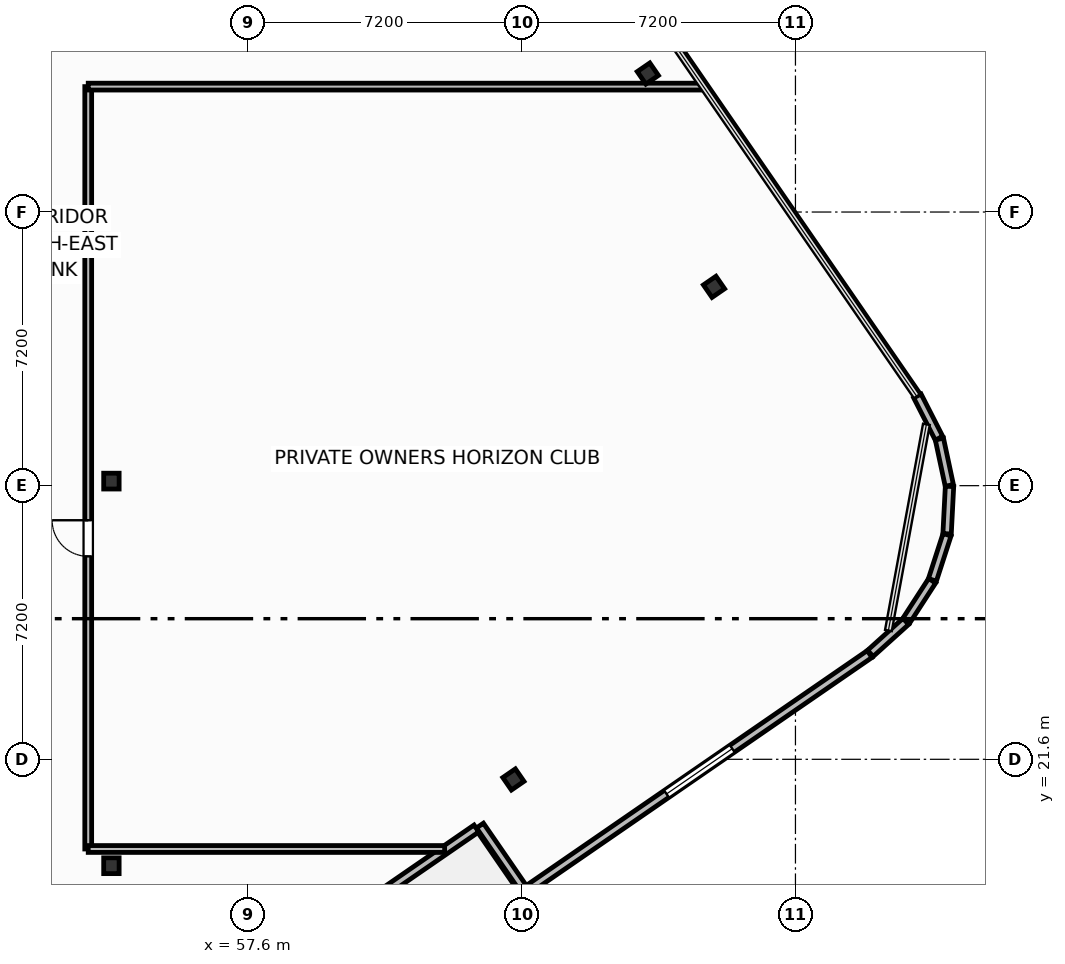
"""IFC4 building model, lengths in metres.
Left out: names, types, materials, properties, quantities, classifications, styles, units other than length and angle.
Written with IfcOpenShell. Run it as: python <this file> out.ifc"""

import sys

from ifc_helpers import new_model, si_unit, direction, frame, frame_2d, origin, origin_2d, place, context, subcontext, project, spatial, rectangle, i_section, extrude, element, fill, save


model = new_model("IFC4")
c1 = context("Model", 3, precision=1e-05, world=origin(), true_north=direction((0.0, 1.0)))
c2 = subcontext(c1, "Body", "Model", "MODEL_VIEW")
j1 = project(units=[si_unit("LENGTHUNIT", "METRE"), si_unit("PLANEANGLEUNIT", "RADIAN")], contexts=[c1])
p1 = place(None, origin())
s1 = spatial("IfcSite", under=j1, at=p1, CompositionType="ELEMENT")
p2 = place(p1, origin())
s2 = spatial("IfcBuilding", under=s1, at=p2, CompositionType="ELEMENT")
p3 = place(p2, frame((0.0, 0.0, 258.2)))
s3 = spatial("IfcBuildingStorey", under=s2, at=p3, CompositionType="ELEMENT", Elevation=258.2)
for number, where, z_axis, x_axis in (
    (1, (54.0, 18.8, 0.0), (0.0, 0.0, 1.0), (1.0, 0.0, 0.0)),
    (2, (54.0, 28.92, 0.0), (0.0, 0.0, 1.0), (1.0, 0.0, 0.0)),
):
    element("IfcColumn", number, at=place(p3, frame(where, z_axis=z_axis, x_axis=x_axis)), inside=s3, PredefinedType="COLUMN", context=c2, shape_type="SweptSolid", body=[
        extrude(i_section(OverallWidth=0.406, OverallDepth=0.416, WebThickness=0.03, FlangeThickness=0.048, FilletRadius=0.025, at=origin_2d()), origin(), (0.0, 0.0, 1.0), 3.7),
    ])
for number, where, z_axis, x_axis in (
    (3, (64.578, 21.07, 0.0), (0.0, 0.0, 1.0), (0.824, 0.567, 0.0)),
    (4, (69.857, 34.031, 0.0), (0.0, 0.0, 1.0), (0.824, 0.567, 0.0)),
    (5, (68.115, 39.644, 0.0), (0.0, 0.0, 1.0), (0.824, 0.567, 0.0)),
):
    element("IfcColumn", number, at=place(p3, frame(where, z_axis=z_axis, x_axis=x_axis)), inside=s3, PredefinedType="COLUMN", context=c2, shape_type="SweptSolid", body=[
        extrude(i_section(OverallWidth=0.401, OverallDepth=0.399, WebThickness=0.025, FlangeThickness=0.04, FilletRadius=0.022, at=origin_2d()), origin(), (0.0, 0.0, 1.0), 3.7),
    ])
p4 = place(p3, frame((63.605, 19.78, 0.0), z_axis=(0.0, 0.0, 1.0), x_axis=(-0.823541290762, -0.567256328665, 0.0)))
e6 = element("IfcWall", 6, at=p4, inside=s3, PredefinedType="SOLIDWALL", context=c2, shape_type="SweptSolid", body=[
    extrude(rectangle(XDim=5.567, YDim=0.22, at=frame_2d((2.784, 0.0))), origin(), (0.0, 0.0, 1.0), 2.73),
])
p5 = place(p4, frame((3.067, 0.0, 0.0)))
e7 = element("IfcOpeningElement", 7, at=p5, cuts=e6, PredefinedType="OPENING", context=c2, shape_type="SweptSolid", body=[
    extrude(rectangle(XDim=2.1, YDim=2.3, at=frame_2d((1.05, 1.15))), frame((0.0, 0.12, 0.0), z_axis=(0.0, -1.0, 0.0), x_axis=(1.0, 0.0, 0.0)), (0.0, 0.0, 1.0), 0.24),
])
p6 = place(p3, frame((63.698, 19.856, 0.0), z_axis=(0.0, 0.0, 1.0), x_axis=(0.567219383419, -0.823566737474, 0.0)))
e8 = element("IfcWall", 8, at=p6, inside=s3, PredefinedType="SOLIDWALL", context=c2, shape_type="SweptSolid", body=[
    extrude(rectangle(XDim=2.1, YDim=0.22, at=frame_2d((1.05, 0.0))), origin(), (0.0, 0.0, 1.0), 2.73),
])
p7 = place(p3, frame((64.992, 18.198, 0.0), z_axis=(0.0, 0.0, 1.0), x_axis=(0.823538117322, 0.56726093583, 0.0)))
e9 = element("IfcWall", 9, at=p7, inside=s3, PredefinedType="SOLIDWALL", context=c2, shape_type="SweptSolid", body=[
    extrude(rectangle(XDim=10.88, YDim=0.22, at=frame_2d((5.44, 0.0))), origin(), (0.0, 0.0, 1.0), 2.73),
])
p8 = place(p7, frame((4.39, 0.0, 0.8)))
e10 = element("IfcOpeningElement", 10, at=p8, cuts=e9, PredefinedType="OPENING", context=c2, shape_type="SweptSolid", body=[
    extrude(rectangle(XDim=2.1, YDim=1.75, at=frame_2d((1.05, 0.875))), frame((0.0, 0.12, 0.0), z_axis=(0.0, -1.0, 0.0), x_axis=(1.0, 0.0, 0.0)), (0.0, 0.0, 1.0), 0.24),
])
p9 = place(p3, frame((73.971, 24.387, 0.0), z_axis=(0.0, 0.0, 1.0), x_axis=(0.742501517089, 0.669844382764, 0.0)))
e11 = element("IfcWall", 11, at=p9, inside=s3, PredefinedType="SOLIDWALL", context=c2, shape_type="SweptSolid", body=[
    extrude(rectangle(XDim=1.257, YDim=0.22, at=frame_2d((0.628, 0.0))), origin(), (0.0, 0.0, 1.0), 2.73),
])
p10 = place(p3, frame((74.917, 25.25, 0.0), z_axis=(0.0, 0.0, 1.0), x_axis=(0.543778157277, 0.839229000731, 0.0)))
e12 = element("IfcWall", 12, at=p10, inside=s3, PredefinedType="SOLIDWALL", context=c2, shape_type="SweptSolid", body=[
    extrude(rectangle(XDim=1.249, YDim=0.22, at=frame_2d((0.624, 0.0))), origin(), (0.0, 0.0, 1.0), 2.73),
])
for number, where, z_axis, x_axis in (
    (13, (75.604, 26.321, 0.0), (0.0, 0.0, 1.0), (0.308, 0.951, 0.0)),
    (14, (75.99, 27.534, 0.0), (0.0, 0.0, 1.0), (0.051, 0.999, 0.0)),
    (15, (76.049, 28.805, 0.0), (0.0, 0.0, 1.0), (-0.209, 0.978, 0.0)),
    (16, (75.777, 30.049, 0.0), (0.0, 0.0, 1.0), (-0.455, 0.891, 0.0)),
):
    element("IfcWall", number, at=place(p3, frame(where, z_axis=z_axis, x_axis=x_axis)), inside=s3, PredefinedType="SOLIDWALL", context=c2, shape_type="SweptSolid", body=[
        extrude(rectangle(XDim=1.249, YDim=0.22, at=frame_2d((0.625, 0.0))), origin(), (0.0, 0.0, 1.0), 2.73),
    ])
p11 = place(p3, frame((53.39, 19.24, 0.0), z_axis=(0.0, 0.0, 1.0), x_axis=(0.0, 1.0, 0.0)))
e17 = element("IfcWall", 17, at=p11, inside=s3, PredefinedType="PARTITIONING", context=c2, shape_type="SweptSolid", body=[
    extrude(rectangle(XDim=20.06, YDim=0.18, at=frame_2d((10.03, 0.0))), origin(), (0.0, 0.0, 1.0), 3.45),
])
p12 = place(p11, frame((7.7, 0.0, 0.0)))
e18 = element("IfcOpeningElement", 18, at=p12, cuts=e17, PredefinedType="OPENING", context=c2, shape_type="SweptSolid", body=[
    extrude(rectangle(XDim=0.95, YDim=2.05, at=frame_2d((0.475, 1.025))), frame((0.0, 0.1, 0.0), z_axis=(0.0, -1.0, 0.0), x_axis=(1.0, 0.0, 0.0)), (0.0, 0.0, 1.0), 0.2),
])
p13 = place(p3, frame((53.39, 19.24, 0.0), z_axis=(0.0, 0.0, 1.0), x_axis=(1.0, 0.0, 0.0)))
e19 = element("IfcWall", 19, at=p13, inside=s3, PredefinedType="PARTITIONING", context=c2, shape_type="SweptSolid", body=[
    extrude(rectangle(XDim=9.378, YDim=0.18, at=frame_2d((4.689, 0.0))), origin(), (0.0, 0.0, 1.0), 2.739),
])
p14 = place(p3, frame((53.39, 39.3, 0.0), z_axis=(0.0, 0.0, 1.0), x_axis=(1.0, 0.0, 0.0)))
e20 = element("IfcWall", 20, at=p14, inside=s3, PredefinedType="PARTITIONING", context=c2, shape_type="SweptSolid", body=[
    extrude(rectangle(XDim=16.149, YDim=0.18, at=frame_2d((8.075, 0.0))), origin(), (0.0, 0.0, 1.0), 2.739),
])
p15 = place(p8, origin())
e21 = element("IfcWindow", 21, at=p15, inside=s3, PartitioningType="SINGLE_PANEL", PredefinedType="WINDOW", context=c2, shape_type="SweptSolid", body=[
    extrude(rectangle(XDim=2.1, YDim=1.75, at=frame_2d((1.05, 0.875))), frame((0.0, 0.03, 0.0), z_axis=(0.0, -1.0, 0.0), x_axis=(1.0, 0.0, 0.0)), (0.0, 0.0, 1.0), 0.06),
])
fill(e10, e21)
p16 = place(p12, origin())
e22 = element("IfcDoor", 22, at=p16, inside=s3, OperationType="SINGLE_SWING_RIGHT", PredefinedType="DOOR", context=c2, shape_type="SweptSolid", body=[
    extrude(rectangle(XDim=0.95, YDim=2.05, at=frame_2d((0.475, 1.025))), frame((0.0, 0.025, 0.0), z_axis=(0.0, -1.0, 0.0), x_axis=(1.0, 0.0, 0.0)), (0.0, 0.0, 1.0), 0.05),
])
fill(e18, e22)
save(model, sys.argv[1])
